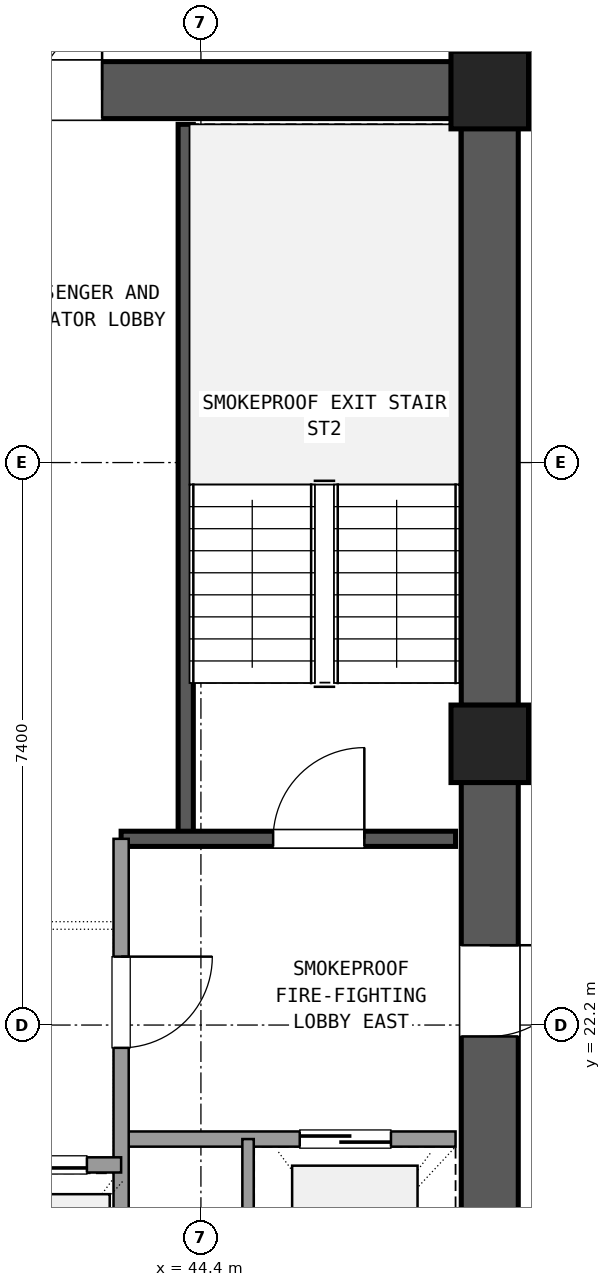
"""IFC4 building model, lengths in metres.
Left out: names, types, materials, properties, quantities, classifications, styles, units other than length and angle.
Written with IfcOpenShell. Run it as: python <this file> out.ifc"""

import sys

from ifc_helpers import new_model, si_unit, direction, frame, frame_2d, origin, origin_2d, place, context, subcontext, project, spatial, rectangle, extrude, element, fill, save


model = new_model("IFC4")
c1 = context("Model", 3, precision=1e-05, world=origin(), true_north=direction((0.0, 1.0)))
c2 = subcontext(c1, "Body", "Model", "MODEL_VIEW")
j1 = project(units=[si_unit("LENGTHUNIT", "METRE"), si_unit("PLANEANGLEUNIT", "RADIAN")], contexts=[c1])
p1 = place(None, origin())
s1 = spatial("IfcSite", under=j1, at=p1, CompositionType="ELEMENT")
p2 = place(p1, origin())
s2 = spatial("IfcBuilding", under=s1, at=p2, CompositionType="ELEMENT")
p3 = place(p2, frame((0.0, 0.0, 149.22)))
s3 = spatial("IfcBuildingStorey", under=s2, at=p3, CompositionType="ELEMENT", Elevation=149.22)
for number, where, z_axis, x_axis in (
    (1, (48.2, 25.9, 0.0), (0.0, 0.0, 1.0), (1.0, 0.0, 0.0)),
    (2, (48.2, 34.5, 0.0), (0.0, 0.0, 1.0), (1.0, 0.0, 0.0)),
):
    element("IfcColumn", number, at=place(p3, frame(where, z_axis=z_axis, x_axis=x_axis)), inside=s3, PredefinedType="COLUMN", context=c2, shape_type="SweptSolid", body=[
        extrude(rectangle(XDim=1.02, YDim=1.02, at=origin_2d()), origin(), (0.0, 0.0, 1.0), 3.6),
    ])
p4 = place(p3, frame((48.2, 17.805, 0.0), z_axis=(0.0, 0.0, 1.0), x_axis=(0.0, 1.0, 0.0)))
e3 = element("IfcWall", 3, at=p4, inside=s3, PredefinedType="SHEAR", context=c2, shape_type="SweptSolid", body=[
    extrude(rectangle(XDim=7.59, YDim=0.75, at=frame_2d((3.795, 0.0))), origin(), (0.0, 0.0, 1.0), 3.32),
])
p5 = place(p4, frame((4.245, 0.0, 0.0)))
e4 = element("IfcOpeningElement", 4, at=p5, cuts=e3, PredefinedType="OPENING", context=c2, shape_type="SweptSolid", body=[
    extrude(rectangle(XDim=1.2, YDim=2.15, at=frame_2d((0.6, 1.075))), frame((0.0, 0.385, 0.0), z_axis=(0.0, -1.0, 0.0), x_axis=(1.0, 0.0, 0.0)), (0.0, 0.0, 1.0), 0.77),
])
p6 = place(p3, frame((48.2, 26.405, 0.0), z_axis=(0.0, 0.0, 1.0), x_axis=(0.0, 1.0, 0.0)))
e5 = element("IfcWall", 5, at=p6, inside=s3, PredefinedType="SHEAR", context=c2, shape_type="SweptSolid", body=[
    extrude(rectangle(XDim=7.59, YDim=0.75, at=frame_2d((3.795, 0.0))), origin(), (0.0, 0.0, 1.0), 3.32),
])
p7 = place(p3, frame((47.695, 34.5, 0.0), z_axis=(0.0, 0.0, 1.0), x_axis=(-1.0, 0.0, 0.0)))
e6 = element("IfcWall", 6, at=p7, inside=s3, PredefinedType="SHEAR", context=c2, shape_type="SweptSolid", body=[
    extrude(rectangle(XDim=10.19, YDim=0.75, at=frame_2d((5.095, 0.0))), origin(), (0.0, 0.0, 1.0), 3.32),
])
p8 = place(p7, frame((4.595, 0.0, 0.0)))
e7 = element("IfcOpeningElement", 7, at=p8, cuts=e6, PredefinedType="OPENING", context=c2, shape_type="SweptSolid", body=[
    extrude(rectangle(XDim=1.6, YDim=2.2, at=frame_2d((0.8, 1.1))), frame((0.0, 0.385, 0.0), z_axis=(0.0, -1.0, 0.0), x_axis=(1.0, 0.0, 0.0)), (0.0, 0.0, 1.0), 0.77),
])
p9 = place(p3, frame((44.2, 24.65, 0.0), z_axis=(0.0, 0.0, 1.0), x_axis=(0.0, 1.0, 0.0)))
e8 = element("IfcWall", 8, at=p9, inside=s3, PredefinedType="SHEAR", context=c2, shape_type="SweptSolid", body=[
    extrude(rectangle(XDim=9.4, YDim=0.2, at=frame_2d((4.7, 0.0))), origin(), (0.0, 0.0, 1.0), 3.32),
])
p10 = place(p3, frame((43.35, 24.65, 0.0), z_axis=(0.0, 0.0, 1.0), x_axis=(1.0, 0.0, 0.0)))
e9 = element("IfcWall", 9, at=p10, inside=s3, PredefinedType="SHEAR", context=c2, shape_type="SweptSolid", body=[
    extrude(rectangle(XDim=4.4, YDim=0.2, at=frame_2d((2.2, 0.0))), origin(), (0.0, 0.0, 1.0), 3.32),
])
p11 = place(p10, frame((2.0, 0.0, 0.0)))
e10 = element("IfcOpeningElement", 10, at=p11, cuts=e9, PredefinedType="OPENING", context=c2, shape_type="SweptSolid", body=[
    extrude(rectangle(XDim=1.2, YDim=2.15, at=frame_2d((0.6, 1.075))), frame((0.0, 0.11, 0.0), z_axis=(0.0, -1.0, 0.0), x_axis=(1.0, 0.0, 0.0)), (0.0, 0.0, 1.0), 0.22),
])
p12 = place(p3, frame((43.35, 20.7, 0.0), z_axis=(0.0, 0.0, 1.0), x_axis=(1.0, 0.0, 0.0)))
e11 = element("IfcWall", 11, at=p12, inside=s3, PredefinedType="SOLIDWALL", context=c2, shape_type="SweptSolid", body=[
    extrude(rectangle(XDim=4.4, YDim=0.2, at=frame_2d((2.2, 0.0))), origin(), (0.0, 0.0, 1.0), 2.61),
])
p13 = place(p12, frame((2.35, 0.0, 0.0)))
e12 = element("IfcOpeningElement", 12, at=p13, cuts=e11, PredefinedType="OPENING", context=c2, shape_type="SweptSolid", body=[
    extrude(rectangle(XDim=1.2, YDim=2.15, at=frame_2d((0.6, 1.075))), frame((0.0, 0.11, 0.0), z_axis=(0.0, -1.0, 0.0), x_axis=(1.0, 0.0, 0.0)), (0.0, 0.0, 1.0), 0.22),
])
p14 = place(p3, frame((43.35, 17.75, 0.0), z_axis=(0.0, 0.0, 1.0), x_axis=(0.0, 1.0, 0.0)))
e13 = element("IfcWall", 13, at=p14, inside=s3, PredefinedType="SOLIDWALL", context=c2, shape_type="SweptSolid", body=[
    extrude(rectangle(XDim=6.9, YDim=0.2, at=frame_2d((3.45, 0.0))), origin(), (0.0, 0.0, 1.0), 2.61),
])
p15 = place(p14, frame((4.15, 0.0, 0.0)))
e14 = element("IfcOpeningElement", 14, at=p15, cuts=e13, PredefinedType="OPENING", context=c2, shape_type="SweptSolid", body=[
    extrude(rectangle(XDim=1.2, YDim=2.15, at=frame_2d((0.6, 1.075))), frame((0.0, 0.11, 0.0), z_axis=(0.0, -1.0, 0.0), x_axis=(1.0, 0.0, 0.0)), (0.0, 0.0, 1.0), 0.22),
])
p16 = place(p3, frame((45.02, 17.75, 0.0), z_axis=(0.0, 0.0, 1.0), x_axis=(0.0, 1.0, 0.0)))
e15 = element("IfcWall", 15, at=p16, inside=s3, PredefinedType="PARTITIONING", context=c2, shape_type="SweptSolid", body=[
    extrude(rectangle(XDim=2.95, YDim=0.15, at=frame_2d((1.475, 0.0))), origin(), (0.0, 0.0, 1.0), 2.61),
])
p17 = place(p3, frame((37.25, 20.36, 0.0), z_axis=(0.0, 0.0, 1.0), x_axis=(1.0, 0.0, 0.0)))
e16 = element("IfcWall", 16, at=p17, inside=s3, PredefinedType="SOLIDWALL", context=c2, shape_type="SweptSolid", body=[
    extrude(rectangle(XDim=6.1, YDim=0.2, at=frame_2d((3.05, 0.0))), origin(), (0.0, 0.0, 1.0), 2.61),
])
p18 = place(p17, frame((0.45, 0.0, 0.0)))
e17 = element("IfcOpeningElement", 17, at=p18, cuts=e16, PredefinedType="OPENING", context=c2, shape_type="SweptSolid", body=[
    extrude(rectangle(XDim=1.1, YDim=2.15, at=frame_2d((0.55, 1.075))), frame((0.0, 0.11, 0.0), z_axis=(0.0, -1.0, 0.0), x_axis=(1.0, 0.0, 0.0)), (0.0, 0.0, 1.0), 0.22),
])
p19 = place(p17, frame((2.5, 0.0, 0.0)))
e18 = element("IfcOpeningElement", 18, at=p19, cuts=e16, PredefinedType="OPENING", context=c2, shape_type="SweptSolid", body=[
    extrude(rectangle(XDim=1.1, YDim=2.15, at=frame_2d((0.55, 1.075))), frame((0.0, 0.11, 0.0), z_axis=(0.0, -1.0, 0.0), x_axis=(1.0, 0.0, 0.0)), (0.0, 0.0, 1.0), 0.22),
])
p20 = place(p17, frame((4.55, 0.0, 0.0)))
e19 = element("IfcOpeningElement", 19, at=p20, cuts=e16, PredefinedType="OPENING", context=c2, shape_type="SweptSolid", body=[
    extrude(rectangle(XDim=1.1, YDim=2.15, at=frame_2d((0.55, 1.075))), frame((0.0, 0.11, 0.0), z_axis=(0.0, -1.0, 0.0), x_axis=(1.0, 0.0, 0.0)), (0.0, 0.0, 1.0), 0.22),
])
p21 = place(p11, origin())
e20 = element("IfcDoor", 20, at=p21, inside=s3, OperationType="SINGLE_SWING_RIGHT", PredefinedType="DOOR", context=c2, shape_type="SweptSolid", body=[
    extrude(rectangle(XDim=1.2, YDim=2.15, at=frame_2d((0.6, 1.075))), frame((0.0, 0.025, 0.0), z_axis=(0.0, -1.0, 0.0), x_axis=(1.0, 0.0, 0.0)), (0.0, 0.0, 1.0), 0.05),
])
fill(e10, e20)
p22 = place(p13, origin())
e21 = element("IfcDoor", 21, at=p22, inside=s3, OperationType="SLIDING_TO_RIGHT", PredefinedType="DOOR", context=c2, shape_type="SweptSolid", body=[
    extrude(rectangle(XDim=1.2, YDim=2.15, at=frame_2d((0.6, 1.075))), frame((0.0, 0.025, 0.0), z_axis=(0.0, -1.0, 0.0), x_axis=(1.0, 0.0, 0.0)), (0.0, 0.0, 1.0), 0.05),
])
fill(e12, e21)
p23 = place(p15, frame((1.2, 0.0, 0.0), z_axis=(0.0, 0.0, 1.0), x_axis=(-1.0, 0.0, 0.0)))
e22 = element("IfcDoor", 22, at=p23, inside=s3, OperationType="SINGLE_SWING_RIGHT", PredefinedType="DOOR", context=c2, shape_type="SweptSolid", body=[
    extrude(rectangle(XDim=1.2, YDim=2.15, at=frame_2d((0.6, 1.075))), frame((0.0, 0.025, 0.0), z_axis=(0.0, -1.0, 0.0), x_axis=(1.0, 0.0, 0.0)), (0.0, 0.0, 1.0), 0.05),
])
fill(e14, e22)
p24 = place(p5, frame((1.2, 0.0, 0.0), z_axis=(0.0, 0.0, 1.0), x_axis=(-1.0, 0.0, 0.0)))
e23 = element("IfcDoor", 23, at=p24, inside=s3, OperationType="SINGLE_SWING_RIGHT", PredefinedType="DOOR", context=c2, shape_type="SweptSolid", body=[
    extrude(rectangle(XDim=1.2, YDim=2.15, at=frame_2d((0.6, 1.075))), frame((0.0, 0.025, 0.0), z_axis=(0.0, -1.0, 0.0), x_axis=(1.0, 0.0, 0.0)), (0.0, 0.0, 1.0), 0.05),
])
fill(e4, e23)
p25 = place(p8, frame((1.6, 0.0, 0.0), z_axis=(0.0, 0.0, 1.0), x_axis=(-1.0, 0.0, 0.0)))
e24 = element("IfcDoor", 24, at=p25, inside=s3, OperationType="DOUBLE_DOOR_SINGLE_SWING", PredefinedType="DOOR", context=c2, shape_type="SweptSolid", body=[
    extrude(rectangle(XDim=1.6, YDim=2.2, at=frame_2d((0.8, 1.1))), frame((0.0, 0.025, 0.0), z_axis=(0.0, -1.0, 0.0), x_axis=(1.0, 0.0, 0.0)), (0.0, 0.0, 1.0), 0.05),
])
fill(e7, e24)
p26 = place(p20, origin())
e25 = element("IfcDoor", 25, at=p26, inside=s3, OperationType="SLIDING_TO_LEFT", PredefinedType="DOOR", context=c2, shape_type="SweptSolid", body=[
    extrude(rectangle(XDim=1.1, YDim=2.15, at=frame_2d((0.55, 1.075))), frame((0.0, 0.025, 0.0), z_axis=(0.0, -1.0, 0.0), x_axis=(1.0, 0.0, 0.0)), (0.0, 0.0, 1.0), 0.05),
])
fill(e19, e25)
save(model, sys.argv[1])
